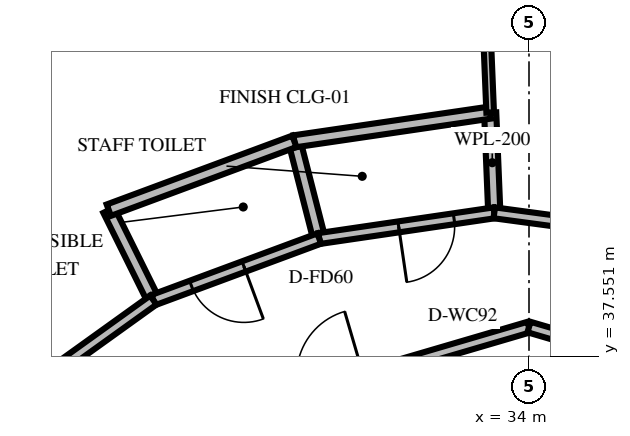
"""IFC4 building model, lengths in metres.
Left out: names, types, materials, properties, quantities, classifications, styles, units other than length and angle.
Written with IfcOpenShell. Run it as: python <this file> out.ifc"""

import sys

from ifc_helpers import new_model, si_unit, direction, frame, frame_2d, origin, place, context, subcontext, project, spatial, rectangle, extrude, element, fill, save


model = new_model("IFC4")
c1 = context("Model", 3, precision=1e-05, world=origin(), true_north=direction((0.0, 1.0)))
c2 = subcontext(c1, "Body", "Model", "MODEL_VIEW")
j1 = project(units=[si_unit("LENGTHUNIT", "METRE"), si_unit("PLANEANGLEUNIT", "RADIAN")], contexts=[c1])
p1 = place(None, origin())
s1 = spatial("IfcSite", under=j1, at=p1, CompositionType="ELEMENT")
p2 = place(p1, origin())
s2 = spatial("IfcBuilding", under=s1, at=p2, CompositionType="ELEMENT")
p3 = place(p2, frame((0.0, 0.0, 84.6)))
s3 = spatial("IfcBuildingStorey", under=s2, at=p3, CompositionType="ELEMENT", Elevation=84.6)
p4 = place(p3, frame((27.5, 36.123, 0.0), z_axis=(0.0, 0.0, 1.0), x_axis=(0.959546654541, 0.281549671923, 0.0)))
e1 = element("IfcWall", 1, at=p4, inside=s3, PredefinedType="PARTITIONING", context=c2, shape_type="SweptSolid", body=[
    extrude(rectangle(XDim=6.774, YDim=0.18, at=frame_2d((3.387, 0.0))), origin(), (0.0, 0.0, 1.0), 2.96),
])
p5 = place(p4, frame((2.837, 0.0, 0.0)))
e2 = element("IfcOpeningElement", 2, at=p5, cuts=e1, PredefinedType="OPENING", context=c2, shape_type="SweptSolid", body=[
    extrude(rectangle(XDim=1.1, YDim=2.15, at=frame_2d((0.55, 1.075))), frame((0.0, 0.1, 0.0), z_axis=(0.0, -1.0, 0.0), x_axis=(1.0, 0.0, 0.0)), (0.0, 0.0, 1.0), 0.2),
])
p6 = place(p3, frame((34.0, 38.03, 0.0), z_axis=(0.0, 0.0, 1.0), x_axis=(0.959546654541, -0.281549671923, 0.0)))
e3 = element("IfcWall", 3, at=p6, inside=s3, PredefinedType="PARTITIONING", context=c2, shape_type="SweptSolid", body=[
    extrude(rectangle(XDim=6.774, YDim=0.18, at=frame_2d((3.387, 0.0))), origin(), (0.0, 0.0, 1.0), 2.96),
])
p7 = place(p6, frame((2.837, 0.0, 0.0)))
e4 = element("IfcOpeningElement", 4, at=p7, cuts=e3, PredefinedType="OPENING", context=c2, shape_type="SweptSolid", body=[
    extrude(rectangle(XDim=1.1, YDim=2.15, at=frame_2d((0.55, 1.075))), frame((0.0, 0.1, 0.0), z_axis=(0.0, -1.0, 0.0), x_axis=(1.0, 0.0, 0.0)), (0.0, 0.0, 1.0), 0.2),
])
for number, where, z_axis, x_axis in (
    (5, (33.429, 39.908, 0.0), (0.0, 0.0, 1.0), (-0.041, 0.999, 0.0)),
    (6, (30.55, 39.486, 0.0), (0.0, 0.0, 1.0), (-0.248, 0.969, 0.0)),
):
    element("IfcWall", number, at=place(p3, frame(where, z_axis=z_axis, x_axis=x_axis)), inside=s3, PredefinedType="PLUMBINGWALL", context=c2, shape_type="SweptSolid", body=[
        extrude(rectangle(XDim=1.65, YDim=0.2, at=frame_2d((0.825, 0.0))), origin(), (0.0, 0.0, 1.0), 2.96),
    ])
p8 = place(p3, frame((33.362, 41.557, 0.0), z_axis=(0.0, 0.0, 1.0), x_axis=(-0.989400694213, -0.145211109392, 0.0)))
e7 = element("IfcWall", 7, at=p8, inside=s3, PredefinedType="PLUMBINGWALL", context=c2, shape_type="SweptSolid", body=[
    extrude(rectangle(XDim=3.255, YDim=0.2, at=frame_2d((1.627, 0.0))), origin(), (0.0, 0.0, 1.0), 2.96),
])
p9 = place(p3, frame((33.429, 39.908, 0.0), z_axis=(0.0, 0.0, 1.0), x_axis=(-0.989398525704, -0.145225883829, 0.0)))
e8 = element("IfcWall", 8, at=p9, inside=s3, PredefinedType="PARTITIONING", context=c2, shape_type="SweptSolid", body=[
    extrude(rectangle(XDim=2.91, YDim=0.18, at=frame_2d((1.455, 0.0))), origin(), (0.0, 0.0, 1.0), 2.96),
])
p10 = place(p9, frame((0.669, 0.0, 0.0)))
e9 = element("IfcOpeningElement", 9, at=p10, cuts=e8, PredefinedType="OPENING", context=c2, shape_type="SweptSolid", body=[
    extrude(rectangle(XDim=0.92, YDim=2.1, at=frame_2d((0.46, 1.05))), frame((0.0, 0.1, 0.0), z_axis=(0.0, -1.0, 0.0), x_axis=(1.0, 0.0, 0.0)), (0.0, 0.0, 1.0), 0.2),
])
p11 = place(p3, frame((27.822, 38.474, 0.0), z_axis=(0.0, 0.0, 1.0), x_axis=(-0.443837252061, 0.896107411912, 0.0)))
e10 = element("IfcWall", 10, at=p11, inside=s3, PredefinedType="PLUMBINGWALL", context=c2, shape_type="SweptSolid", body=[
    extrude(rectangle(XDim=1.65, YDim=0.2, at=frame_2d((0.825, 0.0))), origin(), (0.0, 0.0, 1.0), 2.96),
])
p12 = place(p3, frame((30.141, 41.084, 0.0), z_axis=(0.0, 0.0, 1.0), x_axis=(-0.937602110864, -0.347710054073, 0.0)))
e11 = element("IfcWall", 11, at=p12, inside=s3, PredefinedType="PLUMBINGWALL", context=c2, shape_type="SweptSolid", body=[
    extrude(rectangle(XDim=3.255, YDim=0.2, at=frame_2d((1.627, 0.0))), origin(), (0.0, 0.0, 1.0), 2.96),
])
p13 = place(p3, frame((30.55, 39.486, 0.0), z_axis=(0.0, 0.0, 1.0), x_axis=(-0.937591807845, -0.34773783496, 0.0)))
e12 = element("IfcWall", 12, at=p13, inside=s3, PredefinedType="PARTITIONING", context=c2, shape_type="SweptSolid", body=[
    extrude(rectangle(XDim=2.91, YDim=0.18, at=frame_2d((1.455, 0.0))), origin(), (0.0, 0.0, 1.0), 2.96),
])
p14 = place(p13, frame((1.321, 0.0, 0.0)))
e13 = element("IfcOpeningElement", 13, at=p14, cuts=e12, PredefinedType="OPENING", context=c2, shape_type="SweptSolid", body=[
    extrude(rectangle(XDim=0.92, YDim=2.1, at=frame_2d((0.46, 1.05))), frame((0.0, 0.1, 0.0), z_axis=(0.0, -1.0, 0.0), x_axis=(1.0, 0.0, 0.0)), (0.0, 0.0, 1.0), 0.2),
])
p15 = place(p3, frame((33.362, 41.557, 0.0), z_axis=(0.0, 0.0, 1.0), x_axis=(-0.041010556403, 0.99915871325, 0.0)))
e14 = element("IfcWall", 14, at=p15, inside=s3, PredefinedType="PARTITIONING", context=c2, shape_type="SweptSolid", body=[
    extrude(rectangle(XDim=5.864, YDim=0.125, at=frame_2d((2.932, 0.0))), origin(), (0.0, 0.0, 1.0), 2.96),
])
p16 = place(p3, frame((27.822, 38.474, 0.0), z_axis=(0.0, 0.0, 1.0), x_axis=(-0.812254756388, -0.583302846492, 0.0)))
e15 = element("IfcWall", 15, at=p16, inside=s3, PredefinedType="PARTITIONING", context=c2, shape_type="SweptSolid", body=[
    extrude(rectangle(XDim=4.515, YDim=0.18, at=frame_2d((2.257, 0.0))), origin(), (0.0, 0.0, 1.0), 2.96),
])
p17 = place(p3, frame((38.221, 39.265, 0.0), z_axis=(0.0, 0.0, 1.0), x_axis=(-0.991100422672, 0.133116310719, 0.0)))
e16 = element("IfcWall", 16, at=p17, inside=s3, PredefinedType="PARTITIONING", context=c2, shape_type="SweptSolid", body=[
    extrude(rectangle(XDim=4.834, YDim=0.18, at=frame_2d((2.417, 0.0))), origin(), (0.0, 0.0, 1.0), 2.96),
])
p18 = place(p10, origin())
e17 = element("IfcDoor", 17, at=p18, inside=s3, OperationType="SINGLE_SWING_RIGHT", PredefinedType="DOOR", context=c2, shape_type="SweptSolid", body=[
    extrude(rectangle(XDim=0.92, YDim=2.1, at=frame_2d((0.46, 1.05))), frame((0.0, 0.025, 0.0), z_axis=(0.0, -1.0, 0.0), x_axis=(1.0, 0.0, 0.0)), (0.0, 0.0, 1.0), 0.05),
])
fill(e9, e17)
p19 = place(p14, origin())
e18 = element("IfcDoor", 18, at=p19, inside=s3, OperationType="SINGLE_SWING_LEFT", PredefinedType="DOOR", context=c2, shape_type="SweptSolid", body=[
    extrude(rectangle(XDim=0.92, YDim=2.1, at=frame_2d((0.46, 1.05))), frame((0.0, 0.025, 0.0), z_axis=(0.0, -1.0, 0.0), x_axis=(1.0, 0.0, 0.0)), (0.0, 0.0, 1.0), 0.05),
])
fill(e13, e18)
save(model, sys.argv[1])
